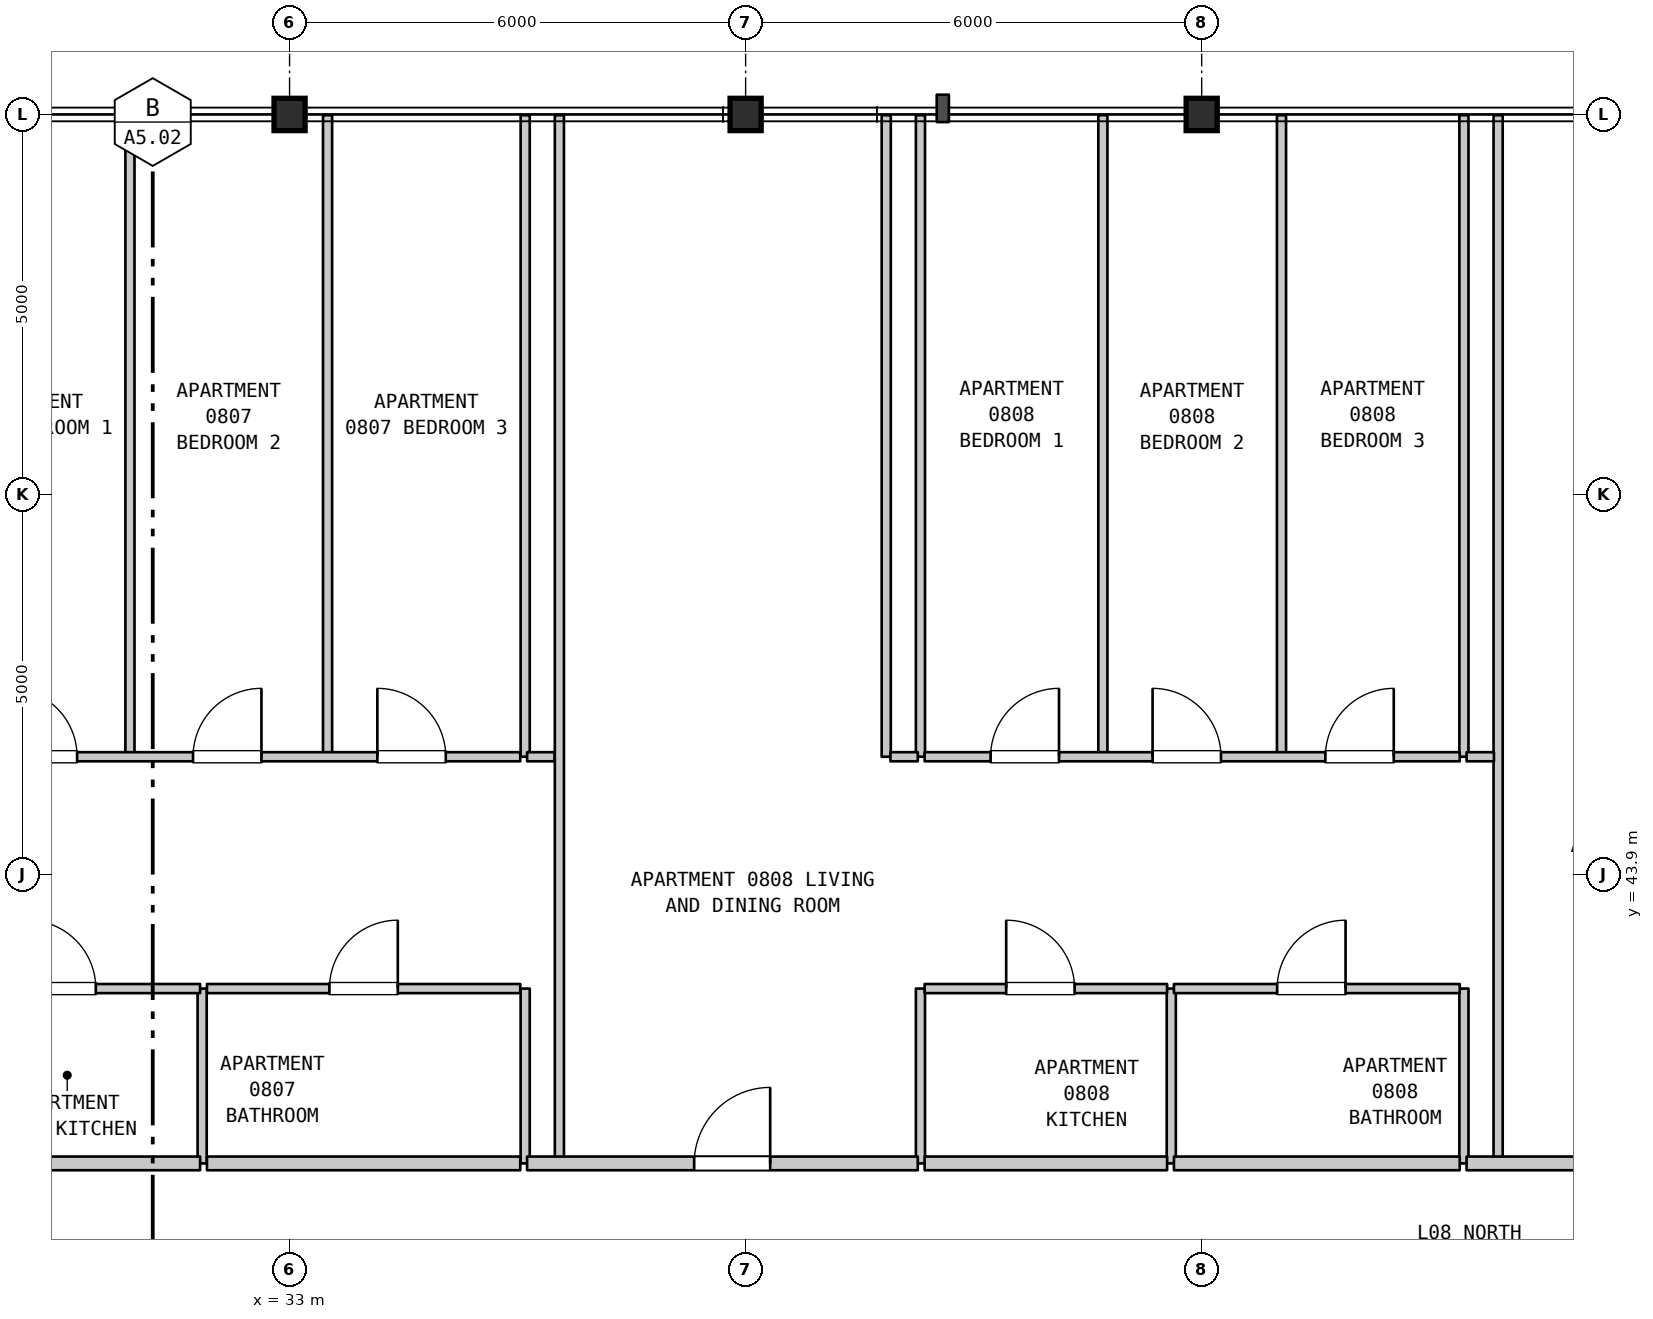
"""IFC4 building model, lengths in metres.
Left out: names, types, materials, properties, quantities, classifications, styles, units other than length and angle.
Written with IfcOpenShell. Run it as: python <this file> out.ifc"""

import sys

from ifc_helpers import new_model, si_unit, direction, frame, frame_2d, origin, origin_2d, place, context, subcontext, project, spatial, rectangle, i_section, extrude, element, fill, save


model = new_model("IFC4")
c1 = context("Model", 3, precision=1e-05, world=origin(), true_north=direction((0.0, 1.0)))
c2 = subcontext(c1, "Body", "Model", "MODEL_VIEW")
j1 = project(units=[si_unit("LENGTHUNIT", "METRE"), si_unit("PLANEANGLEUNIT", "RADIAN")], contexts=[c1])
p1 = place(None, origin())
s1 = spatial("IfcSite", under=j1, at=p1, CompositionType="ELEMENT")
p2 = place(p1, origin())
s2 = spatial("IfcBuilding", under=s1, at=p2, CompositionType="ELEMENT")
p3 = place(p2, frame((0.0, 0.0, 38.8)))
s3 = spatial("IfcBuildingStorey", under=s2, at=p3, CompositionType="ELEMENT", Elevation=38.8)
for number, where, z_axis, x_axis in (
    (1, (33.0, 53.9, 0.0), (0.0, 0.0, 1.0), (1.0, 0.0, 0.0)),
    (2, (39.0, 53.9, 0.0), (0.0, 0.0, 1.0), (1.0, 0.0, 0.0)),
    (3, (45.0, 53.9, 0.0), (0.0, 0.0, 1.0), (1.0, 0.0, 0.0)),
):
    element("IfcColumn", number, at=place(p3, frame(where, z_axis=z_axis, x_axis=x_axis)), inside=s3, PredefinedType="COLUMN", context=c2, shape_type="SweptSolid", body=[
        extrude(i_section(OverallWidth=0.409, OverallDepth=0.425, WebThickness=0.032, FlangeThickness=0.052, FilletRadius=0.015, at=origin_2d()), origin(), (0.0, 0.0, 1.0), 3.7),
    ])
p4 = place(p3, frame((30.9, 45.45, 0.0), z_axis=(0.0, 0.0, 1.0), x_axis=(0.0, 1.0, 0.0)))
e4 = element("IfcWall", 4, at=p4, inside=s3, PredefinedType="PARTITIONING", context=c2, shape_type="SweptSolid", body=[
    extrude(rectangle(XDim=8.44, YDim=0.12, at=frame_2d((4.22, 0.0))), origin(), (0.0, 0.0, 1.0), 3.385),
])
p5 = place(p3, frame((31.85, 40.1, 0.0), z_axis=(0.0, 0.0, 1.0), x_axis=(0.0, 1.0, 0.0)))
e5 = element("IfcWall", 5, at=p5, inside=s3, PredefinedType="PARTITIONING", context=c2, shape_type="SweptSolid", body=[
    extrude(rectangle(XDim=2.3, YDim=0.12, at=frame_2d((1.15, 0.0))), origin(), (0.0, 0.0, 1.0), 3.385),
])
p6 = place(p3, frame((33.5, 45.45, 0.0), z_axis=(0.0, 0.0, 1.0), x_axis=(0.0, 1.0, 0.0)))
e6 = element("IfcWall", 6, at=p6, inside=s3, PredefinedType="PARTITIONING", context=c2, shape_type="SweptSolid", body=[
    extrude(rectangle(XDim=8.44, YDim=0.12, at=frame_2d((4.22, 0.0))), origin(), (0.0, 0.0, 1.0), 3.385),
])
p7 = place(p3, frame((36.1, 40.1, 0.0), z_axis=(0.0, 0.0, 1.0), x_axis=(0.0, 1.0, 0.0)))
e7 = element("IfcWall", 7, at=p7, inside=s3, PredefinedType="PARTITIONING", context=c2, shape_type="SweptSolid", body=[
    extrude(rectangle(XDim=2.3, YDim=0.12, at=frame_2d((1.15, 0.0))), origin(), (0.0, 0.0, 1.0), 3.385),
])
p8 = place(p3, frame((36.1, 45.45, 0.0), z_axis=(0.0, 0.0, 1.0), x_axis=(0.0, 1.0, 0.0)))
e8 = element("IfcWall", 8, at=p8, inside=s3, PredefinedType="PARTITIONING", context=c2, shape_type="SweptSolid", body=[
    extrude(rectangle(XDim=8.44, YDim=0.12, at=frame_2d((4.22, 0.0))), origin(), (0.0, 0.0, 1.0), 3.385),
])
p9 = place(p3, frame((36.55, 40.1, 0.0), z_axis=(0.0, 0.0, 1.0), x_axis=(0.0, 1.0, 0.0)))
e9 = element("IfcWall", 9, at=p9, inside=s3, PredefinedType="PARTITIONING", context=c2, shape_type="SweptSolid", body=[
    extrude(rectangle(XDim=13.79, YDim=0.12, at=frame_2d((6.895, 0.0))), origin(), (0.0, 0.0, 1.0), 3.385),
])
p10 = place(p3, frame((40.85, 45.45, 0.0), z_axis=(0.0, 0.0, 1.0), x_axis=(0.0, 1.0, 0.0)))
e10 = element("IfcWall", 10, at=p10, inside=s3, PredefinedType="PARTITIONING", context=c2, shape_type="SweptSolid", body=[
    extrude(rectangle(XDim=8.44, YDim=0.12, at=frame_2d((4.22, 0.0))), origin(), (0.0, 0.0, 1.0), 3.385),
])
p11 = place(p3, frame((41.3, 40.1, 0.0), z_axis=(0.0, 0.0, 1.0), x_axis=(0.0, 1.0, 0.0)))
e11 = element("IfcWall", 11, at=p11, inside=s3, PredefinedType="PARTITIONING", context=c2, shape_type="SweptSolid", body=[
    extrude(rectangle(XDim=2.3, YDim=0.12, at=frame_2d((1.15, 0.0))), origin(), (0.0, 0.0, 1.0), 3.385),
])
for number, where, z_axis, x_axis in (
    (12, (41.3, 45.45, 0.0), (0.0, 0.0, 1.0), (0.0, 1.0, 0.0)),
    (13, (43.7, 45.45, 0.0), (0.0, 0.0, 1.0), (0.0, 1.0, 0.0)),
):
    element("IfcWall", number, at=place(p3, frame(where, z_axis=z_axis, x_axis=x_axis)), inside=s3, PredefinedType="PARTITIONING", context=c2, shape_type="SweptSolid", body=[
        extrude(rectangle(XDim=8.44, YDim=0.12, at=frame_2d((4.22, 0.0))), origin(), (0.0, 0.0, 1.0), 3.385),
    ])
p12 = place(p3, frame((44.6, 40.1, 0.0), z_axis=(0.0, 0.0, 1.0), x_axis=(0.0, 1.0, 0.0)))
e14 = element("IfcWall", 14, at=p12, inside=s3, PredefinedType="PARTITIONING", context=c2, shape_type="SweptSolid", body=[
    extrude(rectangle(XDim=2.3, YDim=0.12, at=frame_2d((1.15, 0.0))), origin(), (0.0, 0.0, 1.0), 3.385),
])
p13 = place(p3, frame((46.05, 45.45, 0.0), z_axis=(0.0, 0.0, 1.0), x_axis=(0.0, 1.0, 0.0)))
e15 = element("IfcWall", 15, at=p13, inside=s3, PredefinedType="PARTITIONING", context=c2, shape_type="SweptSolid", body=[
    extrude(rectangle(XDim=8.44, YDim=0.12, at=frame_2d((4.22, 0.0))), origin(), (0.0, 0.0, 1.0), 3.385),
])
p14 = place(p3, frame((48.45, 40.1, 0.0), z_axis=(0.0, 0.0, 1.0), x_axis=(0.0, 1.0, 0.0)))
e16 = element("IfcWall", 16, at=p14, inside=s3, PredefinedType="PARTITIONING", context=c2, shape_type="SweptSolid", body=[
    extrude(rectangle(XDim=2.3, YDim=0.12, at=frame_2d((1.15, 0.0))), origin(), (0.0, 0.0, 1.0), 3.385),
])
p15 = place(p3, frame((48.45, 45.45, 0.0), z_axis=(0.0, 0.0, 1.0), x_axis=(0.0, 1.0, 0.0)))
e17 = element("IfcWall", 17, at=p15, inside=s3, PredefinedType="PARTITIONING", context=c2, shape_type="SweptSolid", body=[
    extrude(rectangle(XDim=8.44, YDim=0.12, at=frame_2d((4.22, 0.0))), origin(), (0.0, 0.0, 1.0), 3.385),
])
p16 = place(p3, frame((48.9, 40.1, 0.0), z_axis=(0.0, 0.0, 1.0), x_axis=(0.0, 1.0, 0.0)))
e18 = element("IfcWall", 18, at=p16, inside=s3, PredefinedType="PARTITIONING", context=c2, shape_type="SweptSolid", body=[
    extrude(rectangle(XDim=13.79, YDim=0.12, at=frame_2d((6.895, 0.0))), origin(), (0.0, 0.0, 1.0), 3.385),
])
p17 = place(p3, frame((28.325, 40.1, 0.0), z_axis=(0.0, 0.0, 1.0), x_axis=(1.0, 0.0, 0.0)))
e19 = element("IfcWall", 19, at=p17, inside=s3, PredefinedType="STANDARD", context=c2, shape_type="SweptSolid", body=[
    extrude(rectangle(XDim=3.498, YDim=0.18, at=frame_2d((1.749, 0.0))), origin(), (0.0, 0.0, 1.0), 3.385),
])
p18 = place(p3, frame((31.913, 40.1, 0.0), z_axis=(0.0, 0.0, 1.0), x_axis=(1.0, 0.0, 0.0)))
e20 = element("IfcWall", 20, at=p18, inside=s3, PredefinedType="STANDARD", context=c2, shape_type="SweptSolid", body=[
    extrude(rectangle(XDim=4.122, YDim=0.18, at=frame_2d((2.061, 0.0))), origin(), (0.0, 0.0, 1.0), 3.385),
])
p19 = place(p3, frame((36.125, 40.1, 0.0), z_axis=(0.0, 0.0, 1.0), x_axis=(1.0, 0.0, 0.0)))
e21 = element("IfcWall", 21, at=p19, inside=s3, PredefinedType="STANDARD", context=c2, shape_type="SweptSolid", body=[
    extrude(rectangle(XDim=5.14, YDim=0.18, at=frame_2d((2.57, 0.0))), origin(), (0.0, 0.0, 1.0), 3.385),
])
p20 = place(p19, frame((2.198, 0.0, 0.0)))
e22 = element("IfcOpeningElement", 22, at=p20, cuts=e21, PredefinedType="OPENING", context=c2, shape_type="SweptSolid", body=[
    extrude(rectangle(XDim=1.0, YDim=2.15, at=frame_2d((0.5, 1.075))), frame((0.0, 0.1, 0.0), z_axis=(0.0, -1.0, 0.0), x_axis=(1.0, 0.0, 0.0)), (0.0, 0.0, 1.0), 0.2),
])
p21 = place(p3, frame((41.355, 40.1, 0.0), z_axis=(0.0, 0.0, 1.0), x_axis=(1.0, 0.0, 0.0)))
e23 = element("IfcWall", 23, at=p21, inside=s3, PredefinedType="STANDARD", context=c2, shape_type="SweptSolid", body=[
    extrude(rectangle(XDim=3.19, YDim=0.18, at=frame_2d((1.595, 0.0))), origin(), (0.0, 0.0, 1.0), 3.385),
])
p22 = place(p3, frame((44.635, 40.1, 0.0), z_axis=(0.0, 0.0, 1.0), x_axis=(1.0, 0.0, 0.0)))
e24 = element("IfcWall", 24, at=p22, inside=s3, PredefinedType="STANDARD", context=c2, shape_type="SweptSolid", body=[
    extrude(rectangle(XDim=3.76, YDim=0.18, at=frame_2d((1.88, 0.0))), origin(), (0.0, 0.0, 1.0), 3.385),
])
p23 = place(p3, frame((48.485, 40.1, 0.0), z_axis=(0.0, 0.0, 1.0), x_axis=(1.0, 0.0, 0.0)))
e25 = element("IfcWall", 25, at=p23, inside=s3, PredefinedType="STANDARD", context=c2, shape_type="SweptSolid", body=[
    extrude(rectangle(XDim=5.1, YDim=0.18, at=frame_2d((2.55, 0.0))), origin(), (0.0, 0.0, 1.0), 3.385),
])
p24 = place(p23, frame((2.179, 0.0, 0.0)))
e26 = element("IfcOpeningElement", 26, at=p24, cuts=e25, PredefinedType="OPENING", context=c2, shape_type="SweptSolid", body=[
    extrude(rectangle(XDim=1.0, YDim=2.15, at=frame_2d((0.5, 1.075))), frame((0.0, 0.1, 0.0), z_axis=(0.0, -1.0, 0.0), x_axis=(1.0, 0.0, 0.0)), (0.0, 0.0, 1.0), 0.2),
])
p25 = place(p3, frame((28.325, 42.4, 0.0), z_axis=(0.0, 0.0, 1.0), x_axis=(1.0, 0.0, 0.0)))
e27 = element("IfcWall", 27, at=p25, inside=s3, PredefinedType="PARTITIONING", context=c2, shape_type="SweptSolid", body=[
    extrude(rectangle(XDim=3.498, YDim=0.12, at=frame_2d((1.749, 0.0))), origin(), (0.0, 0.0, 1.0), 3.385),
])
p26 = place(p25, frame((1.226, 0.0, 0.0)))
e28 = element("IfcOpeningElement", 28, at=p26, cuts=e27, PredefinedType="OPENING", context=c2, shape_type="SweptSolid", body=[
    extrude(rectangle(XDim=0.9, YDim=2.15, at=frame_2d((0.45, 1.075))), frame((0.0, 0.07, 0.0), z_axis=(0.0, -1.0, 0.0), x_axis=(1.0, 0.0, 0.0)), (0.0, 0.0, 1.0), 0.14),
])
p27 = place(p3, frame((31.913, 42.4, 0.0), z_axis=(0.0, 0.0, 1.0), x_axis=(1.0, 0.0, 0.0)))
e29 = element("IfcWall", 29, at=p27, inside=s3, PredefinedType="PARTITIONING", context=c2, shape_type="SweptSolid", body=[
    extrude(rectangle(XDim=4.122, YDim=0.12, at=frame_2d((2.061, 0.0))), origin(), (0.0, 0.0, 1.0), 3.385),
])
p28 = place(p27, frame((1.611, 0.0, 0.0)))
e30 = element("IfcOpeningElement", 30, at=p28, cuts=e29, PredefinedType="OPENING", context=c2, shape_type="SweptSolid", body=[
    extrude(rectangle(XDim=0.9, YDim=2.1, at=frame_2d((0.45, 1.05))), frame((0.0, 0.07, 0.0), z_axis=(0.0, -1.0, 0.0), x_axis=(1.0, 0.0, 0.0)), (0.0, 0.0, 1.0), 0.14),
])
p29 = place(p3, frame((41.355, 42.4, 0.0), z_axis=(0.0, 0.0, 1.0), x_axis=(1.0, 0.0, 0.0)))
e31 = element("IfcWall", 31, at=p29, inside=s3, PredefinedType="PARTITIONING", context=c2, shape_type="SweptSolid", body=[
    extrude(rectangle(XDim=3.19, YDim=0.12, at=frame_2d((1.595, 0.0))), origin(), (0.0, 0.0, 1.0), 3.385),
])
p30 = place(p29, frame((1.073, 0.0, 0.0)))
e32 = element("IfcOpeningElement", 32, at=p30, cuts=e31, PredefinedType="OPENING", context=c2, shape_type="SweptSolid", body=[
    extrude(rectangle(XDim=0.9, YDim=2.15, at=frame_2d((0.45, 1.075))), frame((0.0, 0.07, 0.0), z_axis=(0.0, -1.0, 0.0), x_axis=(1.0, 0.0, 0.0)), (0.0, 0.0, 1.0), 0.14),
])
p31 = place(p3, frame((44.635, 42.4, 0.0), z_axis=(0.0, 0.0, 1.0), x_axis=(1.0, 0.0, 0.0)))
e33 = element("IfcWall", 33, at=p31, inside=s3, PredefinedType="PARTITIONING", context=c2, shape_type="SweptSolid", body=[
    extrude(rectangle(XDim=3.76, YDim=0.12, at=frame_2d((1.88, 0.0))), origin(), (0.0, 0.0, 1.0), 3.385),
])
p32 = place(p31, frame((1.358, 0.0, 0.0)))
e34 = element("IfcOpeningElement", 34, at=p32, cuts=e33, PredefinedType="OPENING", context=c2, shape_type="SweptSolid", body=[
    extrude(rectangle(XDim=0.9, YDim=2.1, at=frame_2d((0.45, 1.05))), frame((0.0, 0.07, 0.0), z_axis=(0.0, -1.0, 0.0), x_axis=(1.0, 0.0, 0.0)), (0.0, 0.0, 1.0), 0.14),
])
p33 = place(p3, frame((28.325, 45.45, 0.0), z_axis=(0.0, 0.0, 1.0), x_axis=(1.0, 0.0, 0.0)))
e35 = element("IfcWall", 35, at=p33, inside=s3, PredefinedType="PARTITIONING", context=c2, shape_type="SweptSolid", body=[
    extrude(rectangle(XDim=7.71, YDim=0.12, at=frame_2d((3.855, 0.0))), origin(), (0.0, 0.0, 1.0), 3.385),
])
p34 = place(p33, frame((0.98, 0.0, 0.0)))
e36 = element("IfcOpeningElement", 36, at=p34, cuts=e35, PredefinedType="OPENING", context=c2, shape_type="SweptSolid", body=[
    extrude(rectangle(XDim=0.9, YDim=2.15, at=frame_2d((0.45, 1.075))), frame((0.0, 0.07, 0.0), z_axis=(0.0, -1.0, 0.0), x_axis=(1.0, 0.0, 0.0)), (0.0, 0.0, 1.0), 0.14),
])
p35 = place(p33, frame((3.405, 0.0, 0.0)))
e37 = element("IfcOpeningElement", 37, at=p35, cuts=e35, PredefinedType="OPENING", context=c2, shape_type="SweptSolid", body=[
    extrude(rectangle(XDim=0.9, YDim=2.15, at=frame_2d((0.45, 1.075))), frame((0.0, 0.07, 0.0), z_axis=(0.0, -1.0, 0.0), x_axis=(1.0, 0.0, 0.0)), (0.0, 0.0, 1.0), 0.14),
])
p36 = place(p33, frame((5.83, 0.0, 0.0)))
e38 = element("IfcOpeningElement", 38, at=p36, cuts=e35, PredefinedType="OPENING", context=c2, shape_type="SweptSolid", body=[
    extrude(rectangle(XDim=0.9, YDim=2.15, at=frame_2d((0.45, 1.075))), frame((0.0, 0.07, 0.0), z_axis=(0.0, -1.0, 0.0), x_axis=(1.0, 0.0, 0.0)), (0.0, 0.0, 1.0), 0.14),
])
p37 = place(p3, frame((36.125, 45.45, 0.0), z_axis=(0.0, 0.0, 1.0), x_axis=(1.0, 0.0, 0.0)))
e39 = element("IfcWall", 39, at=p37, inside=s3, PredefinedType="PARTITIONING", context=c2, shape_type="SweptSolid", body=[
    extrude(rectangle(XDim=0.36, YDim=0.12, at=frame_2d((0.18, 0.0))), origin(), (0.0, 0.0, 1.0), 3.385),
])
p38 = place(p3, frame((40.905, 45.45, 0.0), z_axis=(0.0, 0.0, 1.0), x_axis=(1.0, 0.0, 0.0)))
e40 = element("IfcWall", 40, at=p38, inside=s3, PredefinedType="PARTITIONING", context=c2, shape_type="SweptSolid", body=[
    extrude(rectangle(XDim=0.36, YDim=0.12, at=frame_2d((0.18, 0.0))), origin(), (0.0, 0.0, 1.0), 3.385),
])
p39 = place(p3, frame((41.355, 45.45, 0.0), z_axis=(0.0, 0.0, 1.0), x_axis=(1.0, 0.0, 0.0)))
e41 = element("IfcWall", 41, at=p39, inside=s3, PredefinedType="PARTITIONING", context=c2, shape_type="SweptSolid", body=[
    extrude(rectangle(XDim=7.04, YDim=0.12, at=frame_2d((3.52, 0.0))), origin(), (0.0, 0.0, 1.0), 3.385),
])
p40 = place(p39, frame((0.868, 0.0, 0.0)))
e42 = element("IfcOpeningElement", 42, at=p40, cuts=e41, PredefinedType="OPENING", context=c2, shape_type="SweptSolid", body=[
    extrude(rectangle(XDim=0.9, YDim=2.15, at=frame_2d((0.45, 1.075))), frame((0.0, 0.07, 0.0), z_axis=(0.0, -1.0, 0.0), x_axis=(1.0, 0.0, 0.0)), (0.0, 0.0, 1.0), 0.14),
])
p41 = place(p39, frame((2.999, 0.0, 0.0)))
e43 = element("IfcOpeningElement", 43, at=p41, cuts=e41, PredefinedType="OPENING", context=c2, shape_type="SweptSolid", body=[
    extrude(rectangle(XDim=0.9, YDim=2.15, at=frame_2d((0.45, 1.075))), frame((0.0, 0.07, 0.0), z_axis=(0.0, -1.0, 0.0), x_axis=(1.0, 0.0, 0.0)), (0.0, 0.0, 1.0), 0.14),
])
p42 = place(p39, frame((5.272, 0.0, 0.0)))
e44 = element("IfcOpeningElement", 44, at=p42, cuts=e41, PredefinedType="OPENING", context=c2, shape_type="SweptSolid", body=[
    extrude(rectangle(XDim=0.9, YDim=2.15, at=frame_2d((0.45, 1.075))), frame((0.0, 0.07, 0.0), z_axis=(0.0, -1.0, 0.0), x_axis=(1.0, 0.0, 0.0)), (0.0, 0.0, 1.0), 0.14),
])
p43 = place(p3, frame((48.485, 45.45, 0.0), z_axis=(0.0, 0.0, 1.0), x_axis=(1.0, 0.0, 0.0)))
e45 = element("IfcWall", 45, at=p43, inside=s3, PredefinedType="PARTITIONING", context=c2, shape_type="SweptSolid", body=[
    extrude(rectangle(XDim=0.36, YDim=0.12, at=frame_2d((0.18, 0.0))), origin(), (0.0, 0.0, 1.0), 3.385),
])
p44 = place(p20, origin())
e46 = element("IfcDoor", 46, at=p44, inside=s3, OperationType="SINGLE_SWING_RIGHT", PredefinedType="DOOR", context=c2, shape_type="SweptSolid", body=[
    extrude(rectangle(XDim=1.0, YDim=2.15, at=frame_2d((0.5, 1.075))), frame((0.0, 0.025, 0.0), z_axis=(0.0, -1.0, 0.0), x_axis=(1.0, 0.0, 0.0)), (0.0, 0.0, 1.0), 0.05),
])
fill(e22, e46)
p45 = place(p26, origin())
e47 = element("IfcDoor", 47, at=p45, inside=s3, OperationType="SINGLE_SWING_LEFT", PredefinedType="DOOR", context=c2, shape_type="SweptSolid", body=[
    extrude(rectangle(XDim=0.9, YDim=2.15, at=frame_2d((0.45, 1.075))), frame((0.0, 0.025, 0.0), z_axis=(0.0, -1.0, 0.0), x_axis=(1.0, 0.0, 0.0)), (0.0, 0.0, 1.0), 0.05),
])
fill(e28, e47)
p46 = place(p28, origin())
e48 = element("IfcDoor", 48, at=p46, inside=s3, OperationType="SINGLE_SWING_RIGHT", PredefinedType="DOOR", context=c2, shape_type="SweptSolid", body=[
    extrude(rectangle(XDim=0.9, YDim=2.1, at=frame_2d((0.45, 1.05))), frame((0.0, 0.025, 0.0), z_axis=(0.0, -1.0, 0.0), x_axis=(1.0, 0.0, 0.0)), (0.0, 0.0, 1.0), 0.05),
])
fill(e30, e48)
p47 = place(p30, origin())
e49 = element("IfcDoor", 49, at=p47, inside=s3, OperationType="SINGLE_SWING_LEFT", PredefinedType="DOOR", context=c2, shape_type="SweptSolid", body=[
    extrude(rectangle(XDim=0.9, YDim=2.15, at=frame_2d((0.45, 1.075))), frame((0.0, 0.025, 0.0), z_axis=(0.0, -1.0, 0.0), x_axis=(1.0, 0.0, 0.0)), (0.0, 0.0, 1.0), 0.05),
])
fill(e32, e49)
p48 = place(p32, origin())
e50 = element("IfcDoor", 50, at=p48, inside=s3, OperationType="SINGLE_SWING_RIGHT", PredefinedType="DOOR", context=c2, shape_type="SweptSolid", body=[
    extrude(rectangle(XDim=0.9, YDim=2.1, at=frame_2d((0.45, 1.05))), frame((0.0, 0.025, 0.0), z_axis=(0.0, -1.0, 0.0), x_axis=(1.0, 0.0, 0.0)), (0.0, 0.0, 1.0), 0.05),
])
fill(e34, e50)
p49 = place(p34, origin())
e51 = element("IfcDoor", 51, at=p49, inside=s3, OperationType="SINGLE_SWING_LEFT", PredefinedType="DOOR", context=c2, shape_type="SweptSolid", body=[
    extrude(rectangle(XDim=0.9, YDim=2.15, at=frame_2d((0.45, 1.075))), frame((0.0, 0.025, 0.0), z_axis=(0.0, -1.0, 0.0), x_axis=(1.0, 0.0, 0.0)), (0.0, 0.0, 1.0), 0.05),
])
fill(e36, e51)
p50 = place(p35, origin())
e52 = element("IfcDoor", 52, at=p50, inside=s3, OperationType="SINGLE_SWING_RIGHT", PredefinedType="DOOR", context=c2, shape_type="SweptSolid", body=[
    extrude(rectangle(XDim=0.9, YDim=2.15, at=frame_2d((0.45, 1.075))), frame((0.0, 0.025, 0.0), z_axis=(0.0, -1.0, 0.0), x_axis=(1.0, 0.0, 0.0)), (0.0, 0.0, 1.0), 0.05),
])
fill(e37, e52)
p51 = place(p36, origin())
e53 = element("IfcDoor", 53, at=p51, inside=s3, OperationType="SINGLE_SWING_LEFT", PredefinedType="DOOR", context=c2, shape_type="SweptSolid", body=[
    extrude(rectangle(XDim=0.9, YDim=2.15, at=frame_2d((0.45, 1.075))), frame((0.0, 0.025, 0.0), z_axis=(0.0, -1.0, 0.0), x_axis=(1.0, 0.0, 0.0)), (0.0, 0.0, 1.0), 0.05),
])
fill(e38, e53)
p52 = place(p40, origin())
e54 = element("IfcDoor", 54, at=p52, inside=s3, OperationType="SINGLE_SWING_RIGHT", PredefinedType="DOOR", context=c2, shape_type="SweptSolid", body=[
    extrude(rectangle(XDim=0.9, YDim=2.15, at=frame_2d((0.45, 1.075))), frame((0.0, 0.025, 0.0), z_axis=(0.0, -1.0, 0.0), x_axis=(1.0, 0.0, 0.0)), (0.0, 0.0, 1.0), 0.05),
])
fill(e42, e54)
p53 = place(p41, origin())
e55 = element("IfcDoor", 55, at=p53, inside=s3, OperationType="SINGLE_SWING_LEFT", PredefinedType="DOOR", context=c2, shape_type="SweptSolid", body=[
    extrude(rectangle(XDim=0.9, YDim=2.15, at=frame_2d((0.45, 1.075))), frame((0.0, 0.025, 0.0), z_axis=(0.0, -1.0, 0.0), x_axis=(1.0, 0.0, 0.0)), (0.0, 0.0, 1.0), 0.05),
])
fill(e43, e55)
p54 = place(p42, origin())
e56 = element("IfcDoor", 56, at=p54, inside=s3, OperationType="SINGLE_SWING_RIGHT", PredefinedType="DOOR", context=c2, shape_type="SweptSolid", body=[
    extrude(rectangle(XDim=0.9, YDim=2.15, at=frame_2d((0.45, 1.075))), frame((0.0, 0.025, 0.0), z_axis=(0.0, -1.0, 0.0), x_axis=(1.0, 0.0, 0.0)), (0.0, 0.0, 1.0), 0.05),
])
fill(e44, e56)
save(model, sys.argv[1])
